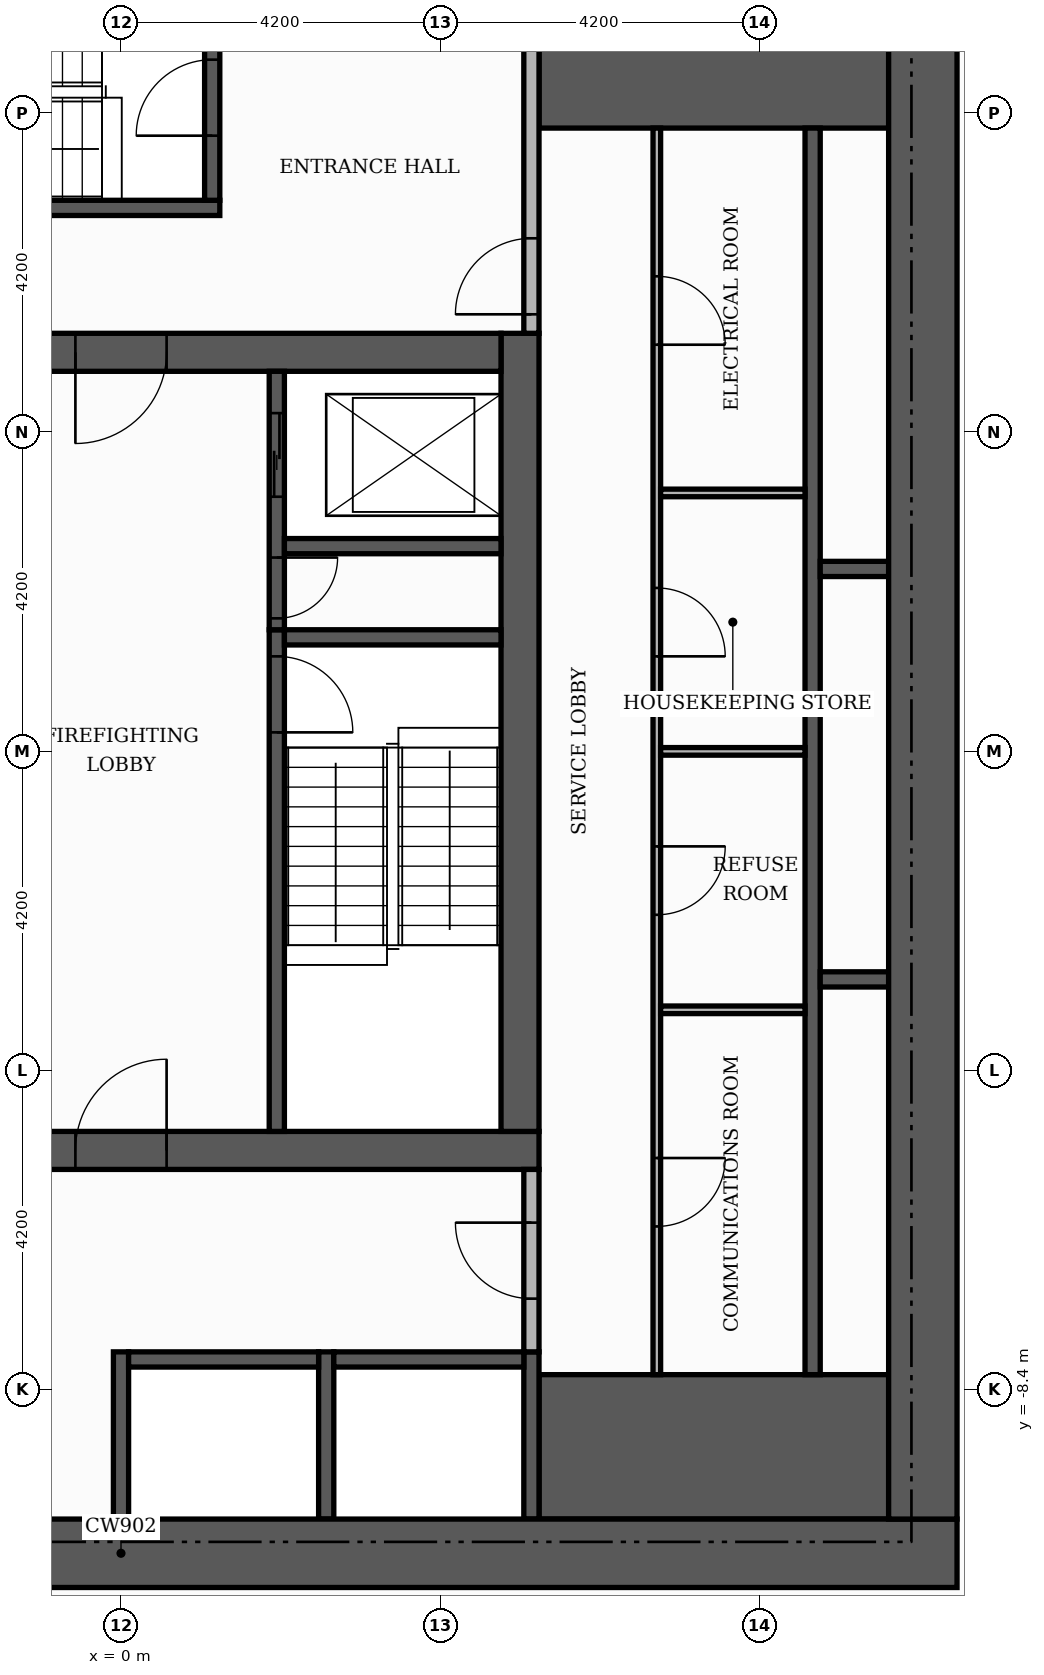
"""IFC4 building model, lengths in metres.
Left out: names, types, materials, properties, quantities, classifications, styles, units other than length and angle.
Written with IfcOpenShell. Run it as: python <this file> out.ifc"""

import sys

from ifc_helpers import new_model, si_unit, direction, frame, frame_2d, origin, place, context, subcontext, project, spatial, rectangle, extrude, element, fill, save


model = new_model("IFC4")
c1 = context("Model", 3, precision=1e-05, world=origin(), true_north=direction((0.0, 1.0)))
c2 = subcontext(c1, "Body", "Model", "MODEL_VIEW")
j1 = project(units=[si_unit("LENGTHUNIT", "METRE"), si_unit("PLANEANGLEUNIT", "RADIAN")], contexts=[c1])
p1 = place(None, origin())
s1 = spatial("IfcSite", under=j1, at=p1, CompositionType="ELEMENT")
p2 = place(p1, origin())
s2 = spatial("IfcBuilding", under=s1, at=p2, CompositionType="ELEMENT")
p3 = place(p2, frame((0.0, 0.0, 87.0)))
s3 = spatial("IfcBuildingStorey", under=s2, at=p3, CompositionType="ELEMENT", Elevation=87.0)
p4 = place(p3, frame((-5.5, -5.25, 0.0), z_axis=(0.0, 0.0, 1.0), x_axis=(1.0, 0.0, 0.0)))
e1 = element("IfcWall", 1, at=p4, inside=s3, PredefinedType="SHEAR", context=c2, shape_type="SweptSolid", body=[
    extrude(rectangle(XDim=11.0, YDim=0.5, at=frame_2d((5.5, 0.0))), origin(), (0.0, 0.0, 1.0), 3.48),
])
p5 = place(p4, frame((4.9, 0.0, 0.0)))
e2 = element("IfcOpeningElement", 2, at=p5, cuts=e1, PredefinedType="OPENING", context=c2, shape_type="SweptSolid", body=[
    extrude(rectangle(XDim=1.2, YDim=2.1, at=frame_2d((0.6, 1.05))), frame((0.0, 0.26, 0.0), z_axis=(0.0, -1.0, 0.0), x_axis=(1.0, 0.0, 0.0)), (0.0, 0.0, 1.0), 0.52),
])
p6 = place(p3, frame((5.25, -5.0, 0.0), z_axis=(0.0, 0.0, 1.0), x_axis=(0.0, 1.0, 0.0)))
e3 = element("IfcWall", 3, at=p6, inside=s3, PredefinedType="SHEAR", context=c2, shape_type="SweptSolid", body=[
    extrude(rectangle(XDim=10.5, YDim=0.5, at=frame_2d((5.25, 0.0))), origin(), (0.0, 0.0, 1.0), 3.48),
])
p7 = place(p3, frame((-5.0, 5.25, 0.0), z_axis=(0.0, 0.0, 1.0), x_axis=(1.0, 0.0, 0.0)))
e4 = element("IfcWall", 4, at=p7, inside=s3, PredefinedType="SHEAR", context=c2, shape_type="SweptSolid", body=[
    extrude(rectangle(XDim=10.0, YDim=0.5, at=frame_2d((5.0, 0.0))), origin(), (0.0, 0.0, 1.0), 3.48),
])
p8 = place(p7, frame((4.4, 0.0, 0.0)))
e5 = element("IfcOpeningElement", 5, at=p8, cuts=e4, PredefinedType="OPENING", context=c2, shape_type="SweptSolid", body=[
    extrude(rectangle(XDim=1.2, YDim=2.1, at=frame_2d((0.6, 1.05))), frame((0.0, 0.26, 0.0), z_axis=(0.0, -1.0, 0.0), x_axis=(1.0, 0.0, 0.0)), (0.0, 0.0, 1.0), 0.52),
])
for number, where, z_axis, x_axis in (
    (6, (5.5, -9.15, 0.0), (0.0, 0.0, 1.0), (1.0, 0.0, 0.0)),
    (7, (5.5, 9.15, 0.0), (0.0, 0.0, 1.0), (1.0, 0.0, 0.0)),
):
    element("IfcWall", number, at=place(p3, frame(where, z_axis=z_axis, x_axis=x_axis)), inside=s3, PredefinedType="SHEAR", context=c2, shape_type="SweptSolid", body=[
        extrude(rectangle(XDim=4.6, YDim=1.9, at=frame_2d((2.3, 0.0))), origin(), (0.0, 0.0, 1.0), 3.48),
    ])
p9 = place(p3, frame((2.05, -5.0, 0.0), z_axis=(0.0, 0.0, 1.0), x_axis=(0.0, 1.0, 0.0)))
e8 = element("IfcWall", 8, at=p9, inside=s3, PredefinedType="SHEAR", context=c2, shape_type="SweptSolid", body=[
    extrude(rectangle(XDim=6.6, YDim=0.2, at=frame_2d((3.3, 0.0))), origin(), (0.0, 0.0, 1.0), 3.48),
])
p10 = place(p9, frame((5.25, 0.0, 0.0)))
e9 = element("IfcOpeningElement", 9, at=p10, cuts=e8, PredefinedType="OPENING", context=c2, shape_type="SweptSolid", body=[
    extrude(rectangle(XDim=1.0, YDim=2.1, at=frame_2d((0.5, 1.05))), frame((0.0, 0.11, 0.0), z_axis=(0.0, -1.0, 0.0), x_axis=(1.0, 0.0, 0.0)), (0.0, 0.0, 1.0), 0.22),
])
p11 = place(p3, frame((2.15, 1.5, 0.0), z_axis=(0.0, 0.0, 1.0), x_axis=(1.0, 0.0, 0.0)))
e10 = element("IfcWall", 10, at=p11, inside=s3, PredefinedType="SHEAR", context=c2, shape_type="SweptSolid", body=[
    extrude(rectangle(XDim=2.85, YDim=0.2, at=frame_2d((1.425, 0.0))), origin(), (0.0, 0.0, 1.0), 3.48),
])
p12 = place(p3, frame((-5.5, 7.15, 0.0), z_axis=(0.0, 0.0, 1.0), x_axis=(1.0, 0.0, 0.0)))
e11 = element("IfcWall", 11, at=p12, inside=s3, PredefinedType="SHEAR", context=c2, shape_type="SweptSolid", body=[
    extrude(rectangle(XDim=6.8, YDim=0.2, at=frame_2d((3.4, 0.0))), origin(), (0.0, 0.0, 1.0), 3.48),
])
p13 = place(p3, frame((1.2, 7.25, 0.0), z_axis=(0.0, 0.0, 1.0), x_axis=(0.0, 1.0, 0.0)))
e12 = element("IfcWall", 12, at=p13, inside=s3, PredefinedType="SHEAR", context=c2, shape_type="SweptSolid", body=[
    extrude(rectangle(XDim=2.85, YDim=0.2, at=frame_2d((1.425, 0.0))), origin(), (0.0, 0.0, 1.0), 3.48),
])
p14 = place(p13, frame((0.85, 0.0, 0.0)))
e13 = element("IfcOpeningElement", 13, at=p14, cuts=e12, PredefinedType="OPENING", context=c2, shape_type="SweptSolid", body=[
    extrude(rectangle(XDim=1.0, YDim=2.1, at=frame_2d((0.5, 1.05))), frame((0.0, 0.11, 0.0), z_axis=(0.0, -1.0, 0.0), x_axis=(1.0, 0.0, 0.0)), (0.0, 0.0, 1.0), 0.22),
])
for number, where, z_axis, x_axis in (
    (14, (0.0, -10.1, 0.0), (0.0, 0.0, 1.0), (0.0, 1.0, 0.0)),
    (15, (2.7, -10.1, 0.0), (0.0, 0.0, 1.0), (0.0, 1.0, 0.0)),
    (16, (5.4, -10.1, 0.0), (0.0, 0.0, 1.0), (0.0, 1.0, 0.0)),
):
    element("IfcWall", number, at=place(p3, frame(where, z_axis=z_axis, x_axis=x_axis)), inside=s3, PredefinedType="SHEAR", context=c2, shape_type="SweptSolid", body=[
        extrude(rectangle(XDim=2.2, YDim=0.2, at=frame_2d((1.1, 0.0))), origin(), (0.0, 0.0, 1.0), 3.48),
    ])
p15 = place(p3, frame((9.1, -8.2, 0.0), z_axis=(0.0, 0.0, 1.0), x_axis=(0.0, 1.0, 0.0)))
e17 = element("IfcWall", 17, at=p15, inside=s3, PredefinedType="SHEAR", context=c2, shape_type="SweptSolid", body=[
    extrude(rectangle(XDim=16.4, YDim=0.2, at=frame_2d((8.2, 0.0))), origin(), (0.0, 0.0, 1.0), 3.48),
])
for number, where, z_axis, x_axis in (
    (18, (0.1, -8.0, 0.0), (0.0, 0.0, 1.0), (1.0, 0.0, 0.0)),
    (19, (2.8, -8.0, 0.0), (0.0, 0.0, 1.0), (1.0, 0.0, 0.0)),
):
    element("IfcWall", number, at=place(p3, frame(where, z_axis=z_axis, x_axis=x_axis)), inside=s3, PredefinedType="SHEAR", context=c2, shape_type="SweptSolid", body=[
        extrude(rectangle(XDim=2.5, YDim=0.2, at=frame_2d((1.25, 0.0))), origin(), (0.0, 0.0, 1.0), 3.48),
    ])
p16 = place(p3, frame((9.2, -3.0, 0.0), z_axis=(0.0, 0.0, 1.0), x_axis=(1.0, 0.0, 0.0)))
e20 = element("IfcWall", 20, at=p16, inside=s3, PredefinedType="SHEAR", context=c2, shape_type="SweptSolid", body=[
    extrude(rectangle(XDim=0.9, YDim=0.2, at=frame_2d((0.45, 0.0))), origin(), (0.0, 0.0, 1.0), 3.48),
])
p17 = place(p3, frame((2.05, 1.6, 0.0), z_axis=(0.0, 0.0, 1.0), x_axis=(0.0, 1.0, 0.0)))
e21 = element("IfcWall", 21, at=p17, inside=s3, PredefinedType="SHEAR", context=c2, shape_type="SweptSolid", body=[
    extrude(rectangle(XDim=3.4, YDim=0.2, at=frame_2d((1.7, 0.0))), origin(), (0.0, 0.0, 1.0), 3.48),
])
p18 = place(p17, frame((1.75, 0.0, 0.0)))
e22 = element("IfcOpeningElement", 22, at=p18, cuts=e21, PredefinedType="OPENING", context=c2, shape_type="SweptSolid", body=[
    extrude(rectangle(XDim=1.1, YDim=2.1, at=frame_2d((0.55, 1.05))), frame((0.0, 0.11, 0.0), z_axis=(0.0, -1.0, 0.0), x_axis=(1.0, 0.0, 0.0)), (0.0, 0.0, 1.0), 0.22),
])
p19 = place(p17, frame((0.15, 0.0, 0.0)))
e23 = element("IfcOpeningElement", 23, at=p19, cuts=e21, PredefinedType="OPENING", context=c2, shape_type="SweptSolid", body=[
    extrude(rectangle(XDim=0.8, YDim=2.1, at=frame_2d((0.4, 1.05))), frame((0.0, 0.11, 0.0), z_axis=(0.0, -1.0, 0.0), x_axis=(1.0, 0.0, 0.0)), (0.0, 0.0, 1.0), 0.22),
])
p20 = place(p3, frame((9.2, 2.4, 0.0), z_axis=(0.0, 0.0, 1.0), x_axis=(1.0, 0.0, 0.0)))
e24 = element("IfcWall", 24, at=p20, inside=s3, PredefinedType="SHEAR", context=c2, shape_type="SweptSolid", body=[
    extrude(rectangle(XDim=0.9, YDim=0.2, at=frame_2d((0.45, 0.0))), origin(), (0.0, 0.0, 1.0), 3.48),
])
p21 = place(p3, frame((2.15, 2.7, 0.0), z_axis=(0.0, 0.0, 1.0), x_axis=(1.0, 0.0, 0.0)))
e25 = element("IfcWall", 25, at=p21, inside=s3, PredefinedType="SHEAR", context=c2, shape_type="SweptSolid", body=[
    extrude(rectangle(XDim=2.85, YDim=0.2, at=frame_2d((1.425, 0.0))), origin(), (0.0, 0.0, 1.0), 3.48),
])
p22 = place(p3, frame((-11.0, -10.55, 0.0), z_axis=(0.0, 0.0, 1.0), x_axis=(1.0, 0.0, 0.0)))
e26 = element("IfcWall", 26, at=p22, inside=s3, PredefinedType="SHEAR", context=c2, shape_type="SweptSolid", body=[
    extrude(rectangle(XDim=22.0, YDim=0.9, at=frame_2d((11.0, 0.0))), origin(), (0.0, 0.0, 1.0), 3.48),
])
p23 = place(p22, frame((7.4, 0.0, 0.0)))
e27 = element("IfcOpeningElement", 27, at=p23, cuts=e26, PredefinedType="OPENING", context=c2, shape_type="SweptSolid", body=[
    extrude(rectangle(XDim=1.8, YDim=2.2, at=frame_2d((0.9, 1.1))), frame((0.0, 0.46, 0.0), z_axis=(0.0, -1.0, 0.0), x_axis=(1.0, 0.0, 0.0)), (0.0, 0.0, 1.0), 0.92),
])
p24 = place(p3, frame((10.55, -10.1, 0.0), z_axis=(0.0, 0.0, 1.0), x_axis=(0.0, 1.0, 0.0)))
e28 = element("IfcWall", 28, at=p24, inside=s3, PredefinedType="SHEAR", context=c2, shape_type="SweptSolid", body=[
    extrude(rectangle(XDim=20.2, YDim=0.9, at=frame_2d((10.1, 0.0))), origin(), (0.0, 0.0, 1.0), 3.48),
])
p25 = place(p3, frame((7.05, -8.2, 0.0), z_axis=(0.0, 0.0, 1.0), x_axis=(0.0, 1.0, 0.0)))
e29 = element("IfcWall", 29, at=p25, inside=s3, PredefinedType="PARTITIONING", context=c2, shape_type="SweptSolid", body=[
    extrude(rectangle(XDim=16.4, YDim=0.1, at=frame_2d((8.2, 0.0))), origin(), (0.0, 0.0, 1.0), 3.48),
])
p26 = place(p25, frame((1.95, 0.0, 0.0)))
e30 = element("IfcOpeningElement", 30, at=p26, cuts=e29, PredefinedType="OPENING", context=c2, shape_type="SweptSolid", body=[
    extrude(rectangle(XDim=0.9, YDim=2.1, at=frame_2d((0.45, 1.05))), frame((0.0, 0.06, 0.0), z_axis=(0.0, -1.0, 0.0), x_axis=(1.0, 0.0, 0.0)), (0.0, 0.0, 1.0), 0.12),
])
p27 = place(p25, frame((6.05, 0.0, 0.0)))
e31 = element("IfcOpeningElement", 31, at=p27, cuts=e29, PredefinedType="OPENING", context=c2, shape_type="SweptSolid", body=[
    extrude(rectangle(XDim=0.9, YDim=2.1, at=frame_2d((0.45, 1.05))), frame((0.0, 0.06, 0.0), z_axis=(0.0, -1.0, 0.0), x_axis=(1.0, 0.0, 0.0)), (0.0, 0.0, 1.0), 0.12),
])
p28 = place(p25, frame((9.45, 0.0, 0.0)))
e32 = element("IfcOpeningElement", 32, at=p28, cuts=e29, PredefinedType="OPENING", context=c2, shape_type="SweptSolid", body=[
    extrude(rectangle(XDim=0.9, YDim=2.1, at=frame_2d((0.45, 1.05))), frame((0.0, 0.06, 0.0), z_axis=(0.0, -1.0, 0.0), x_axis=(1.0, 0.0, 0.0)), (0.0, 0.0, 1.0), 0.12),
])
p29 = place(p25, frame((13.55, 0.0, 0.0)))
e33 = element("IfcOpeningElement", 33, at=p29, cuts=e29, PredefinedType="OPENING", context=c2, shape_type="SweptSolid", body=[
    extrude(rectangle(XDim=0.9, YDim=2.1, at=frame_2d((0.45, 1.05))), frame((0.0, 0.06, 0.0), z_axis=(0.0, -1.0, 0.0), x_axis=(1.0, 0.0, 0.0)), (0.0, 0.0, 1.0), 0.12),
])
p30 = place(p3, frame((5.4, -7.9, 0.0), z_axis=(0.0, 0.0, 1.0), x_axis=(0.0, 1.0, 0.0)))
e34 = element("IfcWall", 34, at=p30, inside=s3, PredefinedType="PARTITIONING", context=c2, shape_type="SweptSolid", body=[
    extrude(rectangle(XDim=2.4, YDim=0.2, at=frame_2d((1.2, 0.0))), origin(), (0.0, 0.0, 1.0), 3.48),
])
p31 = place(p30, frame((0.7, 0.0, 0.0)))
e35 = element("IfcOpeningElement", 35, at=p31, cuts=e34, PredefinedType="OPENING", context=c2, shape_type="SweptSolid", body=[
    extrude(rectangle(XDim=1.0, YDim=2.1, at=frame_2d((0.5, 1.05))), frame((0.0, 0.11, 0.0), z_axis=(0.0, -1.0, 0.0), x_axis=(1.0, 0.0, 0.0)), (0.0, 0.0, 1.0), 0.22),
])
for number, where, z_axis, x_axis in (
    (36, (7.1, -3.4, 0.0), (0.0, 0.0, 1.0), (1.0, 0.0, 0.0)),
    (37, (7.1, 0.0, 0.0), (0.0, 0.0, 1.0), (1.0, 0.0, 0.0)),
    (38, (7.1, 3.4, 0.0), (0.0, 0.0, 1.0), (1.0, 0.0, 0.0)),
):
    element("IfcWall", number, at=place(p3, frame(where, z_axis=z_axis, x_axis=x_axis)), inside=s3, PredefinedType="PARTITIONING", context=c2, shape_type="SweptSolid", body=[
        extrude(rectangle(XDim=1.9, YDim=0.1, at=frame_2d((0.95, 0.0))), origin(), (0.0, 0.0, 1.0), 3.48),
    ])
p32 = place(p3, frame((5.4, 5.5, 0.0), z_axis=(0.0, 0.0, 1.0), x_axis=(0.0, 1.0, 0.0)))
e39 = element("IfcWall", 39, at=p32, inside=s3, PredefinedType="PARTITIONING", context=c2, shape_type="SweptSolid", body=[
    extrude(rectangle(XDim=4.6, YDim=0.2, at=frame_2d((2.3, 0.0))), origin(), (0.0, 0.0, 1.0), 3.48),
])
p33 = place(p32, frame((0.25, 0.0, 0.0)))
e40 = element("IfcOpeningElement", 40, at=p33, cuts=e39, PredefinedType="OPENING", context=c2, shape_type="SweptSolid", body=[
    extrude(rectangle(XDim=1.0, YDim=2.1, at=frame_2d((0.5, 1.05))), frame((0.0, 0.11, 0.0), z_axis=(0.0, -1.0, 0.0), x_axis=(1.0, 0.0, 0.0)), (0.0, 0.0, 1.0), 0.22),
])
p34 = place(p18, origin())
e41 = element("IfcDoor", 41, at=p34, inside=s3, OperationType="SLIDING_TO_LEFT", PredefinedType="DOOR", context=c2, shape_type="SweptSolid", body=[
    extrude(rectangle(XDim=1.1, YDim=2.1, at=frame_2d((0.55, 1.05))), frame((0.0, 0.025, 0.0), z_axis=(0.0, -1.0, 0.0), x_axis=(1.0, 0.0, 0.0)), (0.0, 0.0, 1.0), 0.05),
])
fill(e22, e41)
p35 = place(p10, frame((1.0, 0.0, 0.0), z_axis=(0.0, 0.0, 1.0), x_axis=(-1.0, 0.0, 0.0)))
e42 = element("IfcDoor", 42, at=p35, inside=s3, OperationType="SINGLE_SWING_LEFT", PredefinedType="DOOR", context=c2, shape_type="SweptSolid", body=[
    extrude(rectangle(XDim=1.0, YDim=2.1, at=frame_2d((0.5, 1.05))), frame((0.0, 0.025, 0.0), z_axis=(0.0, -1.0, 0.0), x_axis=(1.0, 0.0, 0.0)), (0.0, 0.0, 1.0), 0.05),
])
fill(e9, e42)
p36 = place(p19, frame((0.8, 0.0, 0.0), z_axis=(0.0, 0.0, 1.0), x_axis=(-1.0, 0.0, 0.0)))
e43 = element("IfcDoor", 43, at=p36, inside=s3, OperationType="SINGLE_SWING_RIGHT", PredefinedType="DOOR", context=c2, shape_type="SweptSolid", body=[
    extrude(rectangle(XDim=0.8, YDim=2.1, at=frame_2d((0.4, 1.05))), frame((0.0, 0.025, 0.0), z_axis=(0.0, -1.0, 0.0), x_axis=(1.0, 0.0, 0.0)), (0.0, 0.0, 1.0), 0.05),
])
fill(e23, e43)
p37 = place(p8, frame((1.2, 0.0, 0.0), z_axis=(0.0, 0.0, 1.0), x_axis=(-1.0, 0.0, 0.0)))
e44 = element("IfcDoor", 44, at=p37, inside=s3, OperationType="SINGLE_SWING_LEFT", PredefinedType="DOOR", context=c2, shape_type="SweptSolid", body=[
    extrude(rectangle(XDim=1.2, YDim=2.1, at=frame_2d((0.6, 1.05))), frame((0.0, 0.025, 0.0), z_axis=(0.0, -1.0, 0.0), x_axis=(1.0, 0.0, 0.0)), (0.0, 0.0, 1.0), 0.05),
])
fill(e5, e44)
p38 = place(p5, origin())
e45 = element("IfcDoor", 45, at=p38, inside=s3, OperationType="SINGLE_SWING_RIGHT", PredefinedType="DOOR", context=c2, shape_type="SweptSolid", body=[
    extrude(rectangle(XDim=1.2, YDim=2.1, at=frame_2d((0.6, 1.05))), frame((0.0, 0.025, 0.0), z_axis=(0.0, -1.0, 0.0), x_axis=(1.0, 0.0, 0.0)), (0.0, 0.0, 1.0), 0.05),
])
fill(e2, e45)
p39 = place(p14, origin())
e46 = element("IfcDoor", 46, at=p39, inside=s3, OperationType="SINGLE_SWING_LEFT", PredefinedType="DOOR", context=c2, shape_type="SweptSolid", body=[
    extrude(rectangle(XDim=1.0, YDim=2.1, at=frame_2d((0.5, 1.05))), frame((0.0, 0.025, 0.0), z_axis=(0.0, -1.0, 0.0), x_axis=(1.0, 0.0, 0.0)), (0.0, 0.0, 1.0), 0.05),
])
fill(e13, e46)
p40 = place(p33, origin())
e47 = element("IfcDoor", 47, at=p40, inside=s3, OperationType="SINGLE_SWING_LEFT", PredefinedType="DOOR", context=c2, shape_type="SweptSolid", body=[
    extrude(rectangle(XDim=1.0, YDim=2.1, at=frame_2d((0.5, 1.05))), frame((0.0, 0.025, 0.0), z_axis=(0.0, -1.0, 0.0), x_axis=(1.0, 0.0, 0.0)), (0.0, 0.0, 1.0), 0.05),
])
fill(e40, e47)
p41 = place(p31, origin())
e48 = element("IfcDoor", 48, at=p41, inside=s3, OperationType="SINGLE_SWING_RIGHT", PredefinedType="DOOR", context=c2, shape_type="SweptSolid", body=[
    extrude(rectangle(XDim=1.0, YDim=2.1, at=frame_2d((0.5, 1.05))), frame((0.0, 0.025, 0.0), z_axis=(0.0, -1.0, 0.0), x_axis=(1.0, 0.0, 0.0)), (0.0, 0.0, 1.0), 0.05),
])
fill(e35, e48)
p42 = place(p26, frame((0.9, 0.0, 0.0), z_axis=(0.0, 0.0, 1.0), x_axis=(-1.0, 0.0, 0.0)))
e49 = element("IfcDoor", 49, at=p42, inside=s3, OperationType="SINGLE_SWING_RIGHT", PredefinedType="DOOR", context=c2, shape_type="SweptSolid", body=[
    extrude(rectangle(XDim=0.9, YDim=2.1, at=frame_2d((0.45, 1.05))), frame((0.0, 0.025, 0.0), z_axis=(0.0, -1.0, 0.0), x_axis=(1.0, 0.0, 0.0)), (0.0, 0.0, 1.0), 0.05),
])
fill(e30, e49)
p43 = place(p27, frame((0.9, 0.0, 0.0), z_axis=(0.0, 0.0, 1.0), x_axis=(-1.0, 0.0, 0.0)))
e50 = element("IfcDoor", 50, at=p43, inside=s3, OperationType="SINGLE_SWING_RIGHT", PredefinedType="DOOR", context=c2, shape_type="SweptSolid", body=[
    extrude(rectangle(XDim=0.9, YDim=2.1, at=frame_2d((0.45, 1.05))), frame((0.0, 0.025, 0.0), z_axis=(0.0, -1.0, 0.0), x_axis=(1.0, 0.0, 0.0)), (0.0, 0.0, 1.0), 0.05),
])
fill(e31, e50)
p44 = place(p28, frame((0.9, 0.0, 0.0), z_axis=(0.0, 0.0, 1.0), x_axis=(-1.0, 0.0, 0.0)))
e51 = element("IfcDoor", 51, at=p44, inside=s3, OperationType="SINGLE_SWING_LEFT", PredefinedType="DOOR", context=c2, shape_type="SweptSolid", body=[
    extrude(rectangle(XDim=0.9, YDim=2.1, at=frame_2d((0.45, 1.05))), frame((0.0, 0.025, 0.0), z_axis=(0.0, -1.0, 0.0), x_axis=(1.0, 0.0, 0.0)), (0.0, 0.0, 1.0), 0.05),
])
fill(e32, e51)
p45 = place(p29, frame((0.9, 0.0, 0.0), z_axis=(0.0, 0.0, 1.0), x_axis=(-1.0, 0.0, 0.0)))
e52 = element("IfcDoor", 52, at=p45, inside=s3, OperationType="SINGLE_SWING_LEFT", PredefinedType="DOOR", context=c2, shape_type="SweptSolid", body=[
    extrude(rectangle(XDim=0.9, YDim=2.1, at=frame_2d((0.45, 1.05))), frame((0.0, 0.025, 0.0), z_axis=(0.0, -1.0, 0.0), x_axis=(1.0, 0.0, 0.0)), (0.0, 0.0, 1.0), 0.05),
])
fill(e33, e52)
save(model, sys.argv[1])
